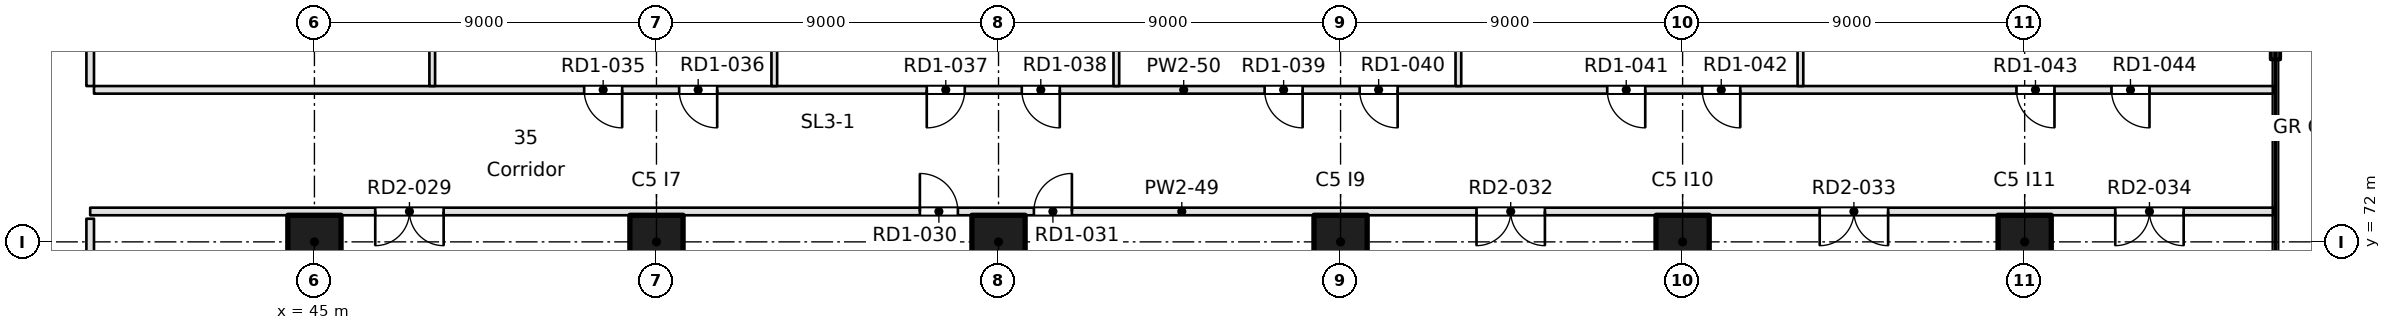
"""IFC4 building model, lengths in metres.
Left out: names, types, materials, properties, quantities, classifications, styles, units other than length and angle.
Written with IfcOpenShell. Run it as: python <this file> out.ifc"""

import sys

from ifc_helpers import new_model, si_unit, direction, frame, frame_2d, origin, origin_2d, place, context, subcontext, project, spatial, rectangle, extrude, element, fill, save


model = new_model("IFC4")
c1 = context("Model", 3, precision=1e-05, world=origin(), true_north=direction((0.0, 1.0)))
c2 = subcontext(c1, "Body", "Model", "MODEL_VIEW")
j1 = project(units=[si_unit("LENGTHUNIT", "METRE"), si_unit("PLANEANGLEUNIT", "RADIAN")], contexts=[c1])
p1 = place(None, origin())
s1 = spatial("IfcSite", under=j1, at=p1, CompositionType="ELEMENT")
p2 = place(p1, origin())
s2 = spatial("IfcBuilding", under=s1, at=p2, CompositionType="ELEMENT")
p3 = place(p2, frame((0.0, 0.0, 46.9)))
s3 = spatial("IfcBuildingStorey", under=s2, at=p3, CompositionType="ELEMENT", Elevation=46.9)
for number, where, z_axis, x_axis in (
    (1, (45.0, 72.0, 0.0), (0.0, 0.0, 1.0), (1.0, 0.0, 0.0)),
    (2, (54.0, 72.0, 0.0), (0.0, 0.0, 1.0), (1.0, 0.0, 0.0)),
    (3, (63.0, 72.0, 0.0), (0.0, 0.0, 1.0), (1.0, 0.0, 0.0)),
    (4, (72.0, 72.0, 0.0), (0.0, 0.0, 1.0), (1.0, 0.0, 0.0)),
    (5, (81.0, 72.0, 0.0), (0.0, 0.0, 1.0), (1.0, 0.0, 0.0)),
    (6, (90.0, 72.0, 0.0), (0.0, 0.0, 1.0), (1.0, 0.0, 0.0)),
):
    element("IfcColumn", number, at=place(p3, frame(where, z_axis=z_axis, x_axis=x_axis)), inside=s3, PredefinedType="COLUMN", context=c2, shape_type="SweptSolid", body=[
        extrude(rectangle(XDim=1.4, YDim=1.4, at=origin_2d()), origin(), (0.0, 0.0, 1.0), 3.7),
    ])
p4 = place(p3, frame((96.599, 76.801, 0.0), z_axis=(0.0, 0.0, 1.0), x_axis=(0.0, 1.0, 0.0)))
e7 = element("IfcWall", 7, at=p4, inside=s3, PredefinedType="SOLIDWALL", context=c2, shape_type="SweptSolid", body=[
    extrude(rectangle(XDim=1.8, YDim=0.25, at=frame_2d((0.9, 0.0))), origin(), (0.0, 0.0, 1.0), 3.3),
])
p5 = place(p4, frame((0.4, 0.0, 0.0)))
e8 = element("IfcOpeningElement", 8, at=p5, cuts=e7, PredefinedType="OPENING", context=c2, shape_type="SweptSolid", body=[
    extrude(rectangle(XDim=1.0, YDim=2.1, at=frame_2d((0.5, 1.05))), frame((0.0, 0.125, 0.0), z_axis=(0.0, -1.0, 0.0), x_axis=(1.0, 0.0, 0.0)), (0.0, 0.0, 1.0), 0.25),
])
p6 = place(p3, frame((96.545, 72.8, 0.0), z_axis=(0.0, 0.0, 1.0), x_axis=(-1.0, 0.0, 0.0)))
e9 = element("IfcWall", 9, at=p6, inside=s3, PredefinedType="PARTITIONING", context=c2, shape_type="SweptSolid", body=[
    extrude(rectangle(XDim=57.445, YDim=0.2, at=frame_2d((28.722, 0.0))), origin(), (0.0, 0.0, 1.0), 3.3),
])
p7 = place(p6, frame((48.145, 0.0, 0.0)))
e10 = element("IfcOpeningElement", 10, at=p7, cuts=e9, PredefinedType="OPENING", context=c2, shape_type="SweptSolid", body=[
    extrude(rectangle(XDim=1.8, YDim=2.1, at=frame_2d((0.9, 1.05))), frame((0.0, 0.1, 0.0), z_axis=(0.0, -1.0, 0.0), x_axis=(1.0, 0.0, 0.0)), (0.0, 0.0, 1.0), 0.2),
])
p8 = place(p6, frame((34.614, 0.0, 0.0)))
e11 = element("IfcOpeningElement", 11, at=p8, cuts=e9, PredefinedType="OPENING", context=c2, shape_type="SweptSolid", body=[
    extrude(rectangle(XDim=1.0, YDim=2.1, at=frame_2d((0.5, 1.05))), frame((0.0, 0.1, 0.0), z_axis=(0.0, -1.0, 0.0), x_axis=(1.0, 0.0, 0.0)), (0.0, 0.0, 1.0), 0.2),
])
p9 = place(p6, frame((31.614, 0.0, 0.0)))
e12 = element("IfcOpeningElement", 12, at=p9, cuts=e9, PredefinedType="OPENING", context=c2, shape_type="SweptSolid", body=[
    extrude(rectangle(XDim=1.0, YDim=2.1, at=frame_2d((0.5, 1.05))), frame((0.0, 0.1, 0.0), z_axis=(0.0, -1.0, 0.0), x_axis=(1.0, 0.0, 0.0)), (0.0, 0.0, 1.0), 0.2),
])
p10 = place(p6, frame((19.168, 0.0, 0.0)))
e13 = element("IfcOpeningElement", 13, at=p10, cuts=e9, PredefinedType="OPENING", context=c2, shape_type="SweptSolid", body=[
    extrude(rectangle(XDim=1.8, YDim=2.1, at=frame_2d((0.9, 1.05))), frame((0.0, 0.1, 0.0), z_axis=(0.0, -1.0, 0.0), x_axis=(1.0, 0.0, 0.0)), (0.0, 0.0, 1.0), 0.2),
])
p11 = place(p6, frame((10.137, 0.0, 0.0)))
e14 = element("IfcOpeningElement", 14, at=p11, cuts=e9, PredefinedType="OPENING", context=c2, shape_type="SweptSolid", body=[
    extrude(rectangle(XDim=1.8, YDim=2.1, at=frame_2d((0.9, 1.05))), frame((0.0, 0.1, 0.0), z_axis=(0.0, -1.0, 0.0), x_axis=(1.0, 0.0, 0.0)), (0.0, 0.0, 1.0), 0.2),
])
p12 = place(p6, frame((2.361, 0.0, 0.0)))
e15 = element("IfcOpeningElement", 15, at=p12, cuts=e9, PredefinedType="OPENING", context=c2, shape_type="SweptSolid", body=[
    extrude(rectangle(XDim=1.8, YDim=2.1, at=frame_2d((0.9, 1.05))), frame((0.0, 0.1, 0.0), z_axis=(0.0, -1.0, 0.0), x_axis=(1.0, 0.0, 0.0)), (0.0, 0.0, 1.0), 0.2),
])
p13 = place(p3, frame((39.2, 76.0, 0.0), z_axis=(0.0, 0.0, 1.0), x_axis=(1.0, 0.0, 0.0)))
e16 = element("IfcWall", 16, at=p13, inside=s3, PredefinedType="PARTITIONING", context=c2, shape_type="SweptSolid", body=[
    extrude(rectangle(XDim=57.345, YDim=0.2, at=frame_2d((28.672, 0.0))), origin(), (0.0, 0.0, 1.0), 3.3),
])
p14 = place(p13, frame((12.897, 0.0, 0.0)))
e17 = element("IfcOpeningElement", 17, at=p14, cuts=e16, PredefinedType="OPENING", context=c2, shape_type="SweptSolid", body=[
    extrude(rectangle(XDim=1.0, YDim=2.1, at=frame_2d((0.5, 1.05))), frame((0.0, 0.1, 0.0), z_axis=(0.0, -1.0, 0.0), x_axis=(1.0, 0.0, 0.0)), (0.0, 0.0, 1.0), 0.2),
])
p15 = place(p13, frame((15.397, 0.0, 0.0)))
e18 = element("IfcOpeningElement", 18, at=p15, cuts=e16, PredefinedType="OPENING", context=c2, shape_type="SweptSolid", body=[
    extrude(rectangle(XDim=1.0, YDim=2.1, at=frame_2d((0.5, 1.05))), frame((0.0, 0.1, 0.0), z_axis=(0.0, -1.0, 0.0), x_axis=(1.0, 0.0, 0.0)), (0.0, 0.0, 1.0), 0.2),
])
p16 = place(p13, frame((21.912, 0.0, 0.0)))
e19 = element("IfcOpeningElement", 19, at=p16, cuts=e16, PredefinedType="OPENING", context=c2, shape_type="SweptSolid", body=[
    extrude(rectangle(XDim=1.0, YDim=2.1, at=frame_2d((0.5, 1.05))), frame((0.0, 0.1, 0.0), z_axis=(0.0, -1.0, 0.0), x_axis=(1.0, 0.0, 0.0)), (0.0, 0.0, 1.0), 0.2),
])
p17 = place(p13, frame((24.412, 0.0, 0.0)))
e20 = element("IfcOpeningElement", 20, at=p17, cuts=e16, PredefinedType="OPENING", context=c2, shape_type="SweptSolid", body=[
    extrude(rectangle(XDim=1.0, YDim=2.1, at=frame_2d((0.5, 1.05))), frame((0.0, 0.1, 0.0), z_axis=(0.0, -1.0, 0.0), x_axis=(1.0, 0.0, 0.0)), (0.0, 0.0, 1.0), 0.2),
])
p18 = place(p13, frame((30.802, 0.0, 0.0)))
e21 = element("IfcOpeningElement", 21, at=p18, cuts=e16, PredefinedType="OPENING", context=c2, shape_type="SweptSolid", body=[
    extrude(rectangle(XDim=1.0, YDim=2.1, at=frame_2d((0.5, 1.05))), frame((0.0, 0.1, 0.0), z_axis=(0.0, -1.0, 0.0), x_axis=(1.0, 0.0, 0.0)), (0.0, 0.0, 1.0), 0.2),
])
p19 = place(p13, frame((33.302, 0.0, 0.0)))
e22 = element("IfcOpeningElement", 22, at=p19, cuts=e16, PredefinedType="OPENING", context=c2, shape_type="SweptSolid", body=[
    extrude(rectangle(XDim=1.0, YDim=2.1, at=frame_2d((0.5, 1.05))), frame((0.0, 0.1, 0.0), z_axis=(0.0, -1.0, 0.0), x_axis=(1.0, 0.0, 0.0)), (0.0, 0.0, 1.0), 0.2),
])
p20 = place(p13, frame((39.817, 0.0, 0.0)))
e23 = element("IfcOpeningElement", 23, at=p20, cuts=e16, PredefinedType="OPENING", context=c2, shape_type="SweptSolid", body=[
    extrude(rectangle(XDim=1.0, YDim=2.1, at=frame_2d((0.5, 1.05))), frame((0.0, 0.1, 0.0), z_axis=(0.0, -1.0, 0.0), x_axis=(1.0, 0.0, 0.0)), (0.0, 0.0, 1.0), 0.2),
])
p21 = place(p13, frame((42.317, 0.0, 0.0)))
e24 = element("IfcOpeningElement", 24, at=p21, cuts=e16, PredefinedType="OPENING", context=c2, shape_type="SweptSolid", body=[
    extrude(rectangle(XDim=1.0, YDim=2.1, at=frame_2d((0.5, 1.05))), frame((0.0, 0.1, 0.0), z_axis=(0.0, -1.0, 0.0), x_axis=(1.0, 0.0, 0.0)), (0.0, 0.0, 1.0), 0.2),
])
p22 = place(p13, frame((50.585, 0.0, 0.0)))
e25 = element("IfcOpeningElement", 25, at=p22, cuts=e16, PredefinedType="OPENING", context=c2, shape_type="SweptSolid", body=[
    extrude(rectangle(XDim=1.0, YDim=2.1, at=frame_2d((0.5, 1.05))), frame((0.0, 0.1, 0.0), z_axis=(0.0, -1.0, 0.0), x_axis=(1.0, 0.0, 0.0)), (0.0, 0.0, 1.0), 0.2),
])
p23 = place(p13, frame((53.085, 0.0, 0.0)))
e26 = element("IfcOpeningElement", 26, at=p23, cuts=e16, PredefinedType="OPENING", context=c2, shape_type="SweptSolid", body=[
    extrude(rectangle(XDim=1.0, YDim=2.1, at=frame_2d((0.5, 1.05))), frame((0.0, 0.1, 0.0), z_axis=(0.0, -1.0, 0.0), x_axis=(1.0, 0.0, 0.0)), (0.0, 0.0, 1.0), 0.2),
])
p24 = place(p3, frame((39.1, 72.609, 0.0), z_axis=(0.0, 0.0, 1.0), x_axis=(0.0, -1.0, 0.0)))
e27 = element("IfcWall", 27, at=p24, inside=s3, PredefinedType="PARTITIONING", context=c2, shape_type="SweptSolid", body=[
    extrude(rectangle(XDim=8.809, YDim=0.2, at=frame_2d((4.404, 0.0))), origin(), (0.0, 0.0, 1.0), 3.3),
])
p25 = place(p3, frame((39.1, 91.85, 0.0), z_axis=(0.0, 0.0, 1.0), x_axis=(0.0, -1.0, 0.0)))
e28 = element("IfcWall", 28, at=p25, inside=s3, PredefinedType="PARTITIONING", context=c2, shape_type="SweptSolid", body=[
    extrude(rectangle(XDim=15.75, YDim=0.2, at=frame_2d((7.875, 0.0))), origin(), (0.0, 0.0, 1.0), 3.3),
])
p26 = place(p25, frame((7.375, 0.0, 0.0)))
e29 = element("IfcOpeningElement", 29, at=p26, cuts=e28, PredefinedType="OPENING", context=c2, shape_type="SweptSolid", body=[
    extrude(rectangle(XDim=1.0, YDim=2.1, at=frame_2d((0.5, 1.05))), frame((0.0, 0.1, 0.0), z_axis=(0.0, -1.0, 0.0), x_axis=(1.0, 0.0, 0.0)), (0.0, 0.0, 1.0), 0.2),
])
p27 = place(p25, frame((4.875, 0.0, 0.0)))
e30 = element("IfcOpeningElement", 30, at=p27, cuts=e28, PredefinedType="OPENING", context=c2, shape_type="SweptSolid", body=[
    extrude(rectangle(XDim=1.0, YDim=2.1, at=frame_2d((0.5, 1.05))), frame((0.0, 0.1, 0.0), z_axis=(0.0, -1.0, 0.0), x_axis=(1.0, 0.0, 0.0)), (0.0, 0.0, 1.0), 0.2),
])
for number, where, z_axis, x_axis in (
    (31, (48.1, 91.85, 0.0), (0.0, 0.0, 1.0), (0.0, -1.0, 0.0)),
    (32, (57.1, 91.85, 0.0), (0.0, 0.0, 1.0), (0.0, -1.0, 0.0)),
    (33, (66.1, 91.85, 0.0), (0.0, 0.0, 1.0), (0.0, -1.0, 0.0)),
    (34, (75.1, 91.85, 0.0), (0.0, 0.0, 1.0), (0.0, -1.0, 0.0)),
    (35, (84.1, 91.85, 0.0), (0.0, 0.0, 1.0), (0.0, -1.0, 0.0)),
):
    element("IfcWall", number, at=place(p3, frame(where, z_axis=z_axis, x_axis=x_axis)), inside=s3, PredefinedType="PARTITIONING", context=c2, shape_type="SweptSolid", body=[
        extrude(rectangle(XDim=15.75, YDim=0.15, at=frame_2d((7.875, 0.0))), origin(), (0.0, 0.0, 1.0), 3.3),
    ])
p28 = place(p7, origin())
e36 = element("IfcDoor", 36, at=p28, inside=s3, OperationType="DOUBLE_DOOR_SINGLE_SWING", PredefinedType="DOOR", context=c2, shape_type="SweptSolid", body=[
    extrude(rectangle(XDim=1.8, YDim=2.1, at=frame_2d((0.9, 1.05))), frame((0.0, 0.025, 0.0), z_axis=(0.0, -1.0, 0.0), x_axis=(1.0, 0.0, 0.0)), (0.0, 0.0, 1.0), 0.05),
])
fill(e10, e36)
p29 = place(p8, frame((1.0, 0.0, 0.0), z_axis=(0.0, 0.0, 1.0), x_axis=(-1.0, 0.0, 0.0)))
e37 = element("IfcDoor", 37, at=p29, inside=s3, OperationType="SINGLE_SWING_LEFT", PredefinedType="DOOR", context=c2, shape_type="SweptSolid", body=[
    extrude(rectangle(XDim=1.0, YDim=2.1, at=frame_2d((0.5, 1.05))), frame((0.0, 0.025, 0.0), z_axis=(0.0, -1.0, 0.0), x_axis=(1.0, 0.0, 0.0)), (0.0, 0.0, 1.0), 0.05),
])
fill(e11, e37)
p30 = place(p9, frame((1.0, 0.0, 0.0), z_axis=(0.0, 0.0, 1.0), x_axis=(-1.0, 0.0, 0.0)))
e38 = element("IfcDoor", 38, at=p30, inside=s3, OperationType="SINGLE_SWING_RIGHT", PredefinedType="DOOR", context=c2, shape_type="SweptSolid", body=[
    extrude(rectangle(XDim=1.0, YDim=2.1, at=frame_2d((0.5, 1.05))), frame((0.0, 0.025, 0.0), z_axis=(0.0, -1.0, 0.0), x_axis=(1.0, 0.0, 0.0)), (0.0, 0.0, 1.0), 0.05),
])
fill(e12, e38)
p31 = place(p10, origin())
e39 = element("IfcDoor", 39, at=p31, inside=s3, OperationType="DOUBLE_DOOR_SINGLE_SWING", PredefinedType="DOOR", context=c2, shape_type="SweptSolid", body=[
    extrude(rectangle(XDim=1.8, YDim=2.1, at=frame_2d((0.9, 1.05))), frame((0.0, 0.025, 0.0), z_axis=(0.0, -1.0, 0.0), x_axis=(1.0, 0.0, 0.0)), (0.0, 0.0, 1.0), 0.05),
])
fill(e13, e39)
p32 = place(p11, origin())
e40 = element("IfcDoor", 40, at=p32, inside=s3, OperationType="DOUBLE_DOOR_SINGLE_SWING", PredefinedType="DOOR", context=c2, shape_type="SweptSolid", body=[
    extrude(rectangle(XDim=1.8, YDim=2.1, at=frame_2d((0.9, 1.05))), frame((0.0, 0.025, 0.0), z_axis=(0.0, -1.0, 0.0), x_axis=(1.0, 0.0, 0.0)), (0.0, 0.0, 1.0), 0.05),
])
fill(e14, e40)
p33 = place(p12, origin())
e41 = element("IfcDoor", 41, at=p33, inside=s3, OperationType="DOUBLE_DOOR_SINGLE_SWING", PredefinedType="DOOR", context=c2, shape_type="SweptSolid", body=[
    extrude(rectangle(XDim=1.8, YDim=2.1, at=frame_2d((0.9, 1.05))), frame((0.0, 0.025, 0.0), z_axis=(0.0, -1.0, 0.0), x_axis=(1.0, 0.0, 0.0)), (0.0, 0.0, 1.0), 0.05),
])
fill(e15, e41)
p34 = place(p14, frame((1.0, 0.0, 0.0), z_axis=(0.0, 0.0, 1.0), x_axis=(-1.0, 0.0, 0.0)))
e42 = element("IfcDoor", 42, at=p34, inside=s3, OperationType="SINGLE_SWING_LEFT", PredefinedType="DOOR", context=c2, shape_type="SweptSolid", body=[
    extrude(rectangle(XDim=1.0, YDim=2.1, at=frame_2d((0.5, 1.05))), frame((0.0, 0.025, 0.0), z_axis=(0.0, -1.0, 0.0), x_axis=(1.0, 0.0, 0.0)), (0.0, 0.0, 1.0), 0.05),
])
fill(e17, e42)
p35 = place(p15, frame((1.0, 0.0, 0.0), z_axis=(0.0, 0.0, 1.0), x_axis=(-1.0, 0.0, 0.0)))
e43 = element("IfcDoor", 43, at=p35, inside=s3, OperationType="SINGLE_SWING_LEFT", PredefinedType="DOOR", context=c2, shape_type="SweptSolid", body=[
    extrude(rectangle(XDim=1.0, YDim=2.1, at=frame_2d((0.5, 1.05))), frame((0.0, 0.025, 0.0), z_axis=(0.0, -1.0, 0.0), x_axis=(1.0, 0.0, 0.0)), (0.0, 0.0, 1.0), 0.05),
])
fill(e18, e43)
p36 = place(p16, frame((1.0, 0.0, 0.0), z_axis=(0.0, 0.0, 1.0), x_axis=(-1.0, 0.0, 0.0)))
e44 = element("IfcDoor", 44, at=p36, inside=s3, OperationType="SINGLE_SWING_RIGHT", PredefinedType="DOOR", context=c2, shape_type="SweptSolid", body=[
    extrude(rectangle(XDim=1.0, YDim=2.1, at=frame_2d((0.5, 1.05))), frame((0.0, 0.025, 0.0), z_axis=(0.0, -1.0, 0.0), x_axis=(1.0, 0.0, 0.0)), (0.0, 0.0, 1.0), 0.05),
])
fill(e19, e44)
p37 = place(p17, frame((1.0, 0.0, 0.0), z_axis=(0.0, 0.0, 1.0), x_axis=(-1.0, 0.0, 0.0)))
e45 = element("IfcDoor", 45, at=p37, inside=s3, OperationType="SINGLE_SWING_LEFT", PredefinedType="DOOR", context=c2, shape_type="SweptSolid", body=[
    extrude(rectangle(XDim=1.0, YDim=2.1, at=frame_2d((0.5, 1.05))), frame((0.0, 0.025, 0.0), z_axis=(0.0, -1.0, 0.0), x_axis=(1.0, 0.0, 0.0)), (0.0, 0.0, 1.0), 0.05),
])
fill(e20, e45)
p38 = place(p18, frame((1.0, 0.0, 0.0), z_axis=(0.0, 0.0, 1.0), x_axis=(-1.0, 0.0, 0.0)))
e46 = element("IfcDoor", 46, at=p38, inside=s3, OperationType="SINGLE_SWING_LEFT", PredefinedType="DOOR", context=c2, shape_type="SweptSolid", body=[
    extrude(rectangle(XDim=1.0, YDim=2.1, at=frame_2d((0.5, 1.05))), frame((0.0, 0.025, 0.0), z_axis=(0.0, -1.0, 0.0), x_axis=(1.0, 0.0, 0.0)), (0.0, 0.0, 1.0), 0.05),
])
fill(e21, e46)
p39 = place(p19, frame((1.0, 0.0, 0.0), z_axis=(0.0, 0.0, 1.0), x_axis=(-1.0, 0.0, 0.0)))
e47 = element("IfcDoor", 47, at=p39, inside=s3, OperationType="SINGLE_SWING_LEFT", PredefinedType="DOOR", context=c2, shape_type="SweptSolid", body=[
    extrude(rectangle(XDim=1.0, YDim=2.1, at=frame_2d((0.5, 1.05))), frame((0.0, 0.025, 0.0), z_axis=(0.0, -1.0, 0.0), x_axis=(1.0, 0.0, 0.0)), (0.0, 0.0, 1.0), 0.05),
])
fill(e22, e47)
p40 = place(p20, frame((1.0, 0.0, 0.0), z_axis=(0.0, 0.0, 1.0), x_axis=(-1.0, 0.0, 0.0)))
e48 = element("IfcDoor", 48, at=p40, inside=s3, OperationType="SINGLE_SWING_LEFT", PredefinedType="DOOR", context=c2, shape_type="SweptSolid", body=[
    extrude(rectangle(XDim=1.0, YDim=2.1, at=frame_2d((0.5, 1.05))), frame((0.0, 0.025, 0.0), z_axis=(0.0, -1.0, 0.0), x_axis=(1.0, 0.0, 0.0)), (0.0, 0.0, 1.0), 0.05),
])
fill(e23, e48)
p41 = place(p21, frame((1.0, 0.0, 0.0), z_axis=(0.0, 0.0, 1.0), x_axis=(-1.0, 0.0, 0.0)))
e49 = element("IfcDoor", 49, at=p41, inside=s3, OperationType="SINGLE_SWING_LEFT", PredefinedType="DOOR", context=c2, shape_type="SweptSolid", body=[
    extrude(rectangle(XDim=1.0, YDim=2.1, at=frame_2d((0.5, 1.05))), frame((0.0, 0.025, 0.0), z_axis=(0.0, -1.0, 0.0), x_axis=(1.0, 0.0, 0.0)), (0.0, 0.0, 1.0), 0.05),
])
fill(e24, e49)
p42 = place(p22, frame((1.0, 0.0, 0.0), z_axis=(0.0, 0.0, 1.0), x_axis=(-1.0, 0.0, 0.0)))
e50 = element("IfcDoor", 50, at=p42, inside=s3, OperationType="SINGLE_SWING_LEFT", PredefinedType="DOOR", context=c2, shape_type="SweptSolid", body=[
    extrude(rectangle(XDim=1.0, YDim=2.1, at=frame_2d((0.5, 1.05))), frame((0.0, 0.025, 0.0), z_axis=(0.0, -1.0, 0.0), x_axis=(1.0, 0.0, 0.0)), (0.0, 0.0, 1.0), 0.05),
])
fill(e25, e50)
p43 = place(p23, frame((1.0, 0.0, 0.0), z_axis=(0.0, 0.0, 1.0), x_axis=(-1.0, 0.0, 0.0)))
e51 = element("IfcDoor", 51, at=p43, inside=s3, OperationType="SINGLE_SWING_LEFT", PredefinedType="DOOR", context=c2, shape_type="SweptSolid", body=[
    extrude(rectangle(XDim=1.0, YDim=2.1, at=frame_2d((0.5, 1.05))), frame((0.0, 0.025, 0.0), z_axis=(0.0, -1.0, 0.0), x_axis=(1.0, 0.0, 0.0)), (0.0, 0.0, 1.0), 0.05),
])
fill(e26, e51)
save(model, sys.argv[1])
